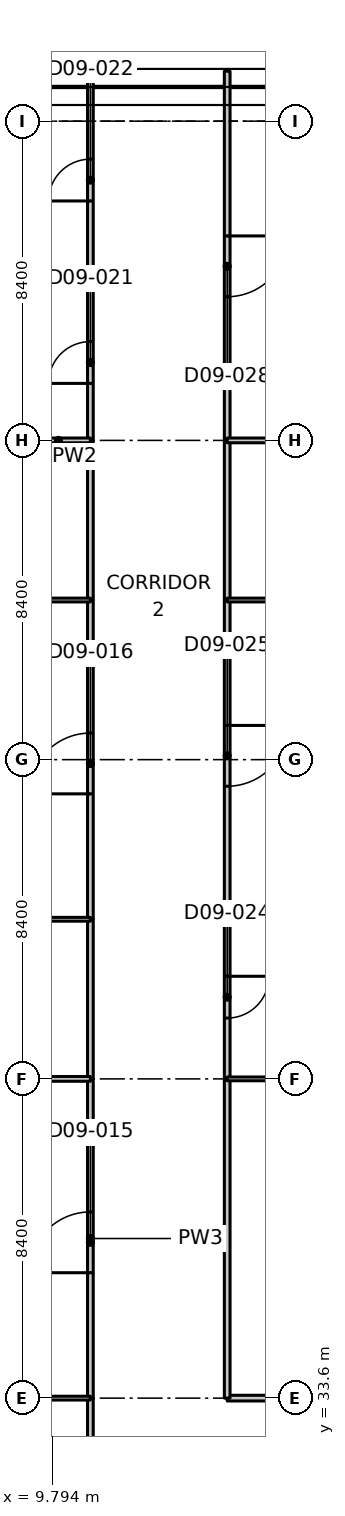
"""IFC4 building model, lengths in metres.
Left out: names, types, materials, properties, quantities, classifications, styles, units other than length and angle.
Written with IfcOpenShell. Run it as: python <this file> out.ifc"""

import sys

from ifc_helpers import new_model, si_unit, direction, frame, frame_2d, origin, place, context, subcontext, project, spatial, polyline, rectangle, outline, extrude, element, fill, save


model = new_model("IFC4")
c1 = context("Model", 3, precision=1e-05, world=origin(), true_north=direction((0.0, 1.0)))
c2 = subcontext(c1, "Body", "Model", "MODEL_VIEW")
j1 = project(units=[si_unit("LENGTHUNIT", "METRE"), si_unit("PLANEANGLEUNIT", "RADIAN")], contexts=[c1])
p1 = place(None, origin())
s1 = spatial("IfcSite", under=j1, at=p1, CompositionType="ELEMENT")
p2 = place(p1, origin())
s2 = spatial("IfcBuilding", under=s1, at=p2, CompositionType="ELEMENT")
p3 = place(p2, frame((0.0, 0.0, 61.7)))
s3 = spatial("IfcBuildingStorey", under=s2, at=p3, CompositionType="ELEMENT", Elevation=61.7)
p4 = place(p3, frame((10.8, 25.2, 0.0), z_axis=(0.0, 0.0, 1.0), x_axis=(0.0, 1.0, 0.0)))
e1 = element("IfcWall", 1, at=p4, inside=s3, PredefinedType="PARTITIONING", context=c2, shape_type="SweptSolid", body=[
    extrude(rectangle(XDim=8.4, YDim=0.15, at=frame_2d((4.2, 0.0))), origin(), (0.0, 0.0, 1.0), 3.33),
])
p5 = place(p4, frame((3.3, 0.0, 0.0)))
e2 = element("IfcOpeningElement", 2, at=p5, cuts=e1, PredefinedType="OPENING", context=c2, shape_type="SweptSolid", body=[
    extrude(rectangle(XDim=1.6, YDim=2.1, at=frame_2d((0.8, 1.05))), frame((0.0, 0.085, 0.0), z_axis=(0.0, -1.0, 0.0), x_axis=(1.0, 0.0, 0.0)), (0.0, 0.0, 1.0), 0.17),
])
p6 = place(p3, frame((14.4, 33.6, 0.0), z_axis=(0.0, 0.0, 1.0), x_axis=(1.0, 0.0, 0.0)))
e3 = element("IfcWall", 3, at=p6, inside=s3, PredefinedType="PARTITIONING", context=c2, shape_type="SweptSolid", body=[
    extrude(rectangle(XDim=1.5, YDim=0.15, at=frame_2d((0.75, 0.0))), origin(), (0.0, 0.0, 1.0), 3.33),
])
p7 = place(p3, frame((10.8, 33.6, 0.0), z_axis=(0.0, 0.0, 1.0), x_axis=(0.0, 1.0, 0.0)))
e4 = element("IfcWall", 4, at=p7, inside=s3, PredefinedType="PARTITIONING", context=c2, shape_type="SweptSolid", body=[
    extrude(rectangle(XDim=8.4, YDim=0.15, at=frame_2d((4.2, 0.0))), origin(), (0.0, 0.0, 1.0), 3.33),
])
p8 = place(p7, frame((3.3, 0.0, 0.0)))
e5 = element("IfcOpeningElement", 5, at=p8, cuts=e4, PredefinedType="OPENING", context=c2, shape_type="SweptSolid", body=[
    extrude(rectangle(XDim=1.6, YDim=2.1, at=frame_2d((0.8, 1.05))), frame((0.0, 0.085, 0.0), z_axis=(0.0, -1.0, 0.0), x_axis=(1.0, 0.0, 0.0)), (0.0, 0.0, 1.0), 0.17),
])
p9 = place(p3, frame((10.8, 46.2, 0.0), z_axis=(0.0, 0.0, 1.0), x_axis=(0.0, 1.0, 0.0)))
e6 = element("IfcWall", 6, at=p9, inside=s3, PredefinedType="PARTITIONING", context=c2, shape_type="SweptSolid", body=[
    extrude(rectangle(XDim=8.4, YDim=0.15, at=frame_2d((4.2, 0.0))), origin(), (0.0, 0.0, 1.0), 3.33),
])
p10 = place(p9, frame((3.3, 0.0, 0.0)))
e7 = element("IfcOpeningElement", 7, at=p10, cuts=e6, PredefinedType="OPENING", context=c2, shape_type="SweptSolid", body=[
    extrude(rectangle(XDim=1.6, YDim=2.1, at=frame_2d((0.8, 1.05))), frame((0.0, 0.085, 0.0), z_axis=(0.0, -1.0, 0.0), x_axis=(1.0, 0.0, 0.0)), (0.0, 0.0, 1.0), 0.17),
])
for number, where, z_axis, x_axis in (
    (8, (10.8, 54.6, 0.0), (0.0, 0.0, 1.0), (0.0, 1.0, 0.0)),
    (9, (10.8, 42.0, 0.0), (0.0, 0.0, 1.0), (0.0, 1.0, 0.0)),
):
    element("IfcWall", number, at=place(p3, frame(where, z_axis=z_axis, x_axis=x_axis)), inside=s3, PredefinedType="PARTITIONING", context=c2, shape_type="SweptSolid", body=[
        extrude(rectangle(XDim=4.2, YDim=0.15, at=frame_2d((2.1, 0.0))), origin(), (0.0, 0.0, 1.0), 3.33),
    ])
p11 = place(p3, frame((10.8, 58.8, 0.0), z_axis=(0.0, 0.0, 1.0), x_axis=(0.0, 1.0, 0.0)))
e10 = element("IfcWall", 10, at=p11, inside=s3, PredefinedType="PARTITIONING", context=c2, shape_type="SweptSolid", body=[
    extrude(rectangle(XDim=4.2, YDim=0.15, at=frame_2d((2.1, 0.0))), origin(), (0.0, 0.0, 1.0), 3.33),
])
p12 = place(p11, frame((1.5, 0.0, 0.0)))
e11 = element("IfcOpeningElement", 11, at=p12, cuts=e10, PredefinedType="OPENING", context=c2, shape_type="SweptSolid", body=[
    extrude(rectangle(XDim=1.1, YDim=2.1, at=frame_2d((0.55, 1.05))), frame((0.0, 0.085, 0.0), z_axis=(0.0, -1.0, 0.0), x_axis=(1.0, 0.0, 0.0)), (0.0, 0.0, 1.0), 0.17),
])
p13 = place(p3, frame((10.8, 63.0, 0.0), z_axis=(0.0, 0.0, 1.0), x_axis=(0.0, 1.0, 0.0)))
e12 = element("IfcWall", 12, at=p13, inside=s3, PredefinedType="PARTITIONING", context=c2, shape_type="SweptSolid", body=[
    extrude(outline(polyline([(0.0, 0.0), (5.514, 0.0), (5.514, 3.33), (5.28, 3.33), (4.65, 3.33), (4.648, 2.98), (3.752, 2.98), (3.75, 3.33), (0.0, 3.33), (0.0, 0.0)])), frame((0.0, 0.075, 0.0), z_axis=(0.0, -1.0, 0.0), x_axis=(1.0, 0.0, 0.0)), (0.0, 0.0, 1.0), 0.15),
])
p14 = place(p13, frame((2.1, 0.0, 0.0)))
e13 = element("IfcOpeningElement", 13, at=p14, cuts=e12, PredefinedType="OPENING", context=c2, shape_type="SweptSolid", body=[
    extrude(rectangle(XDim=1.1, YDim=2.1, at=frame_2d((0.55, 1.05))), frame((0.0, 0.085, 0.0), z_axis=(0.0, -1.0, 0.0), x_axis=(1.0, 0.0, 0.0)), (0.0, 0.0, 1.0), 0.17),
])
p15 = place(p3, frame((14.4, 42.0, 0.0), z_axis=(0.0, 0.0, 1.0), x_axis=(0.0, -1.0, 0.0)))
e14 = element("IfcWall", 14, at=p15, inside=s3, PredefinedType="PARTITIONING", context=c2, shape_type="SweptSolid", body=[
    extrude(rectangle(XDim=8.4, YDim=0.15, at=frame_2d((4.2, 0.0))), origin(), (0.0, 0.0, 1.0), 3.33),
])
p16 = place(p3, frame((14.4, 46.2, 0.0), z_axis=(0.0, 0.0, 1.0), x_axis=(0.0, -1.0, 0.0)))
e15 = element("IfcWall", 15, at=p16, inside=s3, PredefinedType="PARTITIONING", context=c2, shape_type="SweptSolid", body=[
    extrude(rectangle(XDim=4.2, YDim=0.15, at=frame_2d((2.1, 0.0))), origin(), (0.0, 0.0, 1.0), 3.33),
])
p17 = place(p16, frame((1.5, 0.0, 0.0)))
e16 = element("IfcOpeningElement", 16, at=p17, cuts=e15, PredefinedType="OPENING", context=c2, shape_type="SweptSolid", body=[
    extrude(rectangle(XDim=1.1, YDim=2.1, at=frame_2d((0.55, 1.05))), frame((0.0, 0.085, 0.0), z_axis=(0.0, -1.0, 0.0), x_axis=(1.0, 0.0, 0.0)), (0.0, 0.0, 1.0), 0.17),
])
p18 = place(p3, frame((14.4, 54.6, 0.0), z_axis=(0.0, 0.0, 1.0), x_axis=(0.0, -1.0, 0.0)))
e17 = element("IfcWall", 17, at=p18, inside=s3, PredefinedType="PARTITIONING", context=c2, shape_type="SweptSolid", body=[
    extrude(rectangle(XDim=8.4, YDim=0.15, at=frame_2d((4.2, 0.0))), origin(), (0.0, 0.0, 1.0), 3.33),
])
p19 = place(p18, frame((3.3, 0.0, 0.0)))
e18 = element("IfcOpeningElement", 18, at=p19, cuts=e17, PredefinedType="OPENING", context=c2, shape_type="SweptSolid", body=[
    extrude(rectangle(XDim=1.6, YDim=2.1, at=frame_2d((0.8, 1.05))), frame((0.0, 0.085, 0.0), z_axis=(0.0, -1.0, 0.0), x_axis=(1.0, 0.0, 0.0)), (0.0, 0.0, 1.0), 0.17),
])
p20 = place(p3, frame((14.4, 58.8, 0.0), z_axis=(0.0, 0.0, 1.0), x_axis=(0.0, -1.0, 0.0)))
e19 = element("IfcWall", 19, at=p20, inside=s3, PredefinedType="PARTITIONING", context=c2, shape_type="SweptSolid", body=[
    extrude(rectangle(XDim=4.2, YDim=0.15, at=frame_2d((2.1, 0.0))), origin(), (0.0, 0.0, 1.0), 3.33),
])
p21 = place(p3, frame((14.4, 68.514, 0.0), z_axis=(0.0, 0.0, 1.0), x_axis=(0.0, -1.0, 0.0)))
e20 = element("IfcWall", 20, at=p21, inside=s3, PredefinedType="PARTITIONING", context=c2, shape_type="SweptSolid", body=[
    extrude(outline(polyline([(0.0, 0.0), (9.714, 0.0), (9.714, 3.33), (1.764, 3.33), (1.762, 2.98), (0.866, 2.98), (0.864, 3.33), (0.234, 3.33), (0.0, 3.33), (0.0, 0.0)])), frame((0.0, 0.075, 0.0), z_axis=(0.0, -1.0, 0.0), x_axis=(1.0, 0.0, 0.0)), (0.0, 0.0, 1.0), 0.15),
])
p22 = place(p21, frame((4.334, 0.0, 0.0)))
e21 = element("IfcOpeningElement", 21, at=p22, cuts=e20, PredefinedType="OPENING", context=c2, shape_type="SweptSolid", body=[
    extrude(rectangle(XDim=1.6, YDim=2.1, at=frame_2d((0.8, 1.05))), frame((0.0, 0.085, 0.0), z_axis=(0.0, -1.0, 0.0), x_axis=(1.0, 0.0, 0.0)), (0.0, 0.0, 1.0), 0.17),
])
p23 = place(p3, frame((9.12, 33.6, 0.0), z_axis=(0.0, 0.0, 1.0), x_axis=(1.0, 0.0, 0.0)))
e22 = element("IfcWall", 22, at=p23, inside=s3, PredefinedType="PARTITIONING", context=c2, shape_type="SweptSolid", body=[
    extrude(rectangle(XDim=1.68, YDim=0.1, at=frame_2d((0.84, 0.0))), origin(), (0.0, 0.0, 1.0), 3.33),
])
p24 = place(p3, frame((9.12, 42.0, 0.0), z_axis=(0.0, 0.0, 1.0), x_axis=(1.0, 0.0, 0.0)))
e23 = element("IfcWall", 23, at=p24, inside=s3, PredefinedType="PARTITIONING", context=c2, shape_type="SweptSolid", body=[
    extrude(rectangle(XDim=1.68, YDim=0.125, at=frame_2d((0.84, 0.0))), origin(), (0.0, 0.0, 1.0), 3.33),
])
p25 = place(p3, frame((4.2, 54.6, 0.0), z_axis=(0.0, 0.0, 1.0), x_axis=(1.0, 0.0, 0.0)))
e24 = element("IfcWall", 24, at=p25, inside=s3, PredefinedType="PARTITIONING", context=c2, shape_type="SweptSolid", body=[
    extrude(rectangle(XDim=6.6, YDim=0.1, at=frame_2d((3.3, 0.0))), origin(), (0.0, 0.0, 1.0), 3.33),
])
p26 = place(p25, frame((2.7, 0.0, 0.0)))
e25 = element("IfcOpeningElement", 25, at=p26, cuts=e24, PredefinedType="OPENING", context=c2, shape_type="SweptSolid", body=[
    extrude(rectangle(XDim=1.0, YDim=2.1, at=frame_2d((0.5, 1.05))), frame((0.0, 0.06, 0.0), z_axis=(0.0, -1.0, 0.0), x_axis=(1.0, 0.0, 0.0)), (0.0, 0.0, 1.0), 0.12),
])
p27 = place(p3, frame((10.8, 46.2, 0.0), z_axis=(0.0, 0.0, 1.0), x_axis=(-1.0, 0.0, 0.0)))
e26 = element("IfcWall", 26, at=p27, inside=s3, PredefinedType="PARTITIONING", context=c2, shape_type="SweptSolid", body=[
    extrude(rectangle(XDim=7.2, YDim=0.1, at=frame_2d((3.6, 0.0))), origin(), (0.0, 0.0, 1.0), 3.33),
])
p28 = place(p27, frame((3.0, 0.0, 0.0)))
e27 = element("IfcOpeningElement", 27, at=p28, cuts=e26, PredefinedType="OPENING", context=c2, shape_type="SweptSolid", body=[
    extrude(rectangle(XDim=1.0, YDim=2.1, at=frame_2d((0.5, 1.05))), frame((0.0, 0.06, 0.0), z_axis=(0.0, -1.0, 0.0), x_axis=(1.0, 0.0, 0.0)), (0.0, 0.0, 1.0), 0.12),
])
p29 = place(p3, frame((9.12, 58.8, 0.0), z_axis=(0.0, 0.0, 1.0), x_axis=(1.0, 0.0, 0.0)))
e28 = element("IfcWall", 28, at=p29, inside=s3, PredefinedType="PARTITIONING", context=c2, shape_type="SweptSolid", body=[
    extrude(rectangle(XDim=1.68, YDim=0.125, at=frame_2d((0.84, 0.0))), origin(), (0.0, 0.0, 1.0), 3.33),
])
p30 = place(p3, frame((-0.2, 63.0, 0.0), z_axis=(0.0, 0.0, 1.0), x_axis=(1.0, 0.0, 0.0)))
e29 = element("IfcWall", 29, at=p30, inside=s3, PredefinedType="PARTITIONING", context=c2, shape_type="SweptSolid", body=[
    extrude(outline(polyline([(0.0, 0.0), (11.0, 0.0), (11.0, 3.33), (5.066, 3.33), (5.064, 2.98), (3.736, 2.98), (3.734, 3.33), (0.0, 3.33), (0.0, 0.0)])), frame((0.0, 0.05, 0.0), z_axis=(0.0, -1.0, 0.0), x_axis=(1.0, 0.0, 0.0)), (0.0, 0.0, 1.0), 0.1),
])
p31 = place(p3, frame((14.4, 42.0, 0.0), z_axis=(0.0, 0.0, 1.0), x_axis=(1.0, 0.0, 0.0)))
e30 = element("IfcWall", 30, at=p31, inside=s3, PredefinedType="PARTITIONING", context=c2, shape_type="SweptSolid", body=[
    extrude(rectangle(XDim=1.68, YDim=0.1, at=frame_2d((0.84, 0.0))), origin(), (0.0, 0.0, 1.0), 3.33),
])
p32 = place(p3, frame((14.4, 46.2, 0.0), z_axis=(0.0, 0.0, 1.0), x_axis=(1.0, 0.0, 0.0)))
e31 = element("IfcWall", 31, at=p32, inside=s3, PredefinedType="PARTITIONING", context=c2, shape_type="SweptSolid", body=[
    extrude(outline(polyline([(0.0, 0.0), (12.165, 0.0), (12.165, 3.33), (11.9, 3.33), (11.25, 3.33), (11.248, 2.98), (10.352, 2.98), (10.35, 3.33), (0.0, 3.33), (0.0, 0.0)])), frame((0.0, 0.062, 0.0), z_axis=(0.0, -1.0, 0.0), x_axis=(1.0, 0.0, 0.0)), (0.0, 0.0, 1.0), 0.125),
])
p33 = place(p3, frame((14.4, 54.6, 0.0), z_axis=(0.0, 0.0, 1.0), x_axis=(1.0, 0.0, 0.0)))
e32 = element("IfcWall", 32, at=p33, inside=s3, PredefinedType="PARTITIONING", context=c2, shape_type="SweptSolid", body=[
    extrude(rectangle(XDim=7.8, YDim=0.1, at=frame_2d((3.9, 0.0))), origin(), (0.0, 0.0, 1.0), 3.33),
])
p34 = place(p33, frame((3.3, 0.0, 0.0)))
e33 = element("IfcOpeningElement", 33, at=p34, cuts=e32, PredefinedType="OPENING", context=c2, shape_type="SweptSolid", body=[
    extrude(rectangle(XDim=1.0, YDim=2.1, at=frame_2d((0.5, 1.05))), frame((0.0, 0.06, 0.0), z_axis=(0.0, -1.0, 0.0), x_axis=(1.0, 0.0, 0.0)), (0.0, 0.0, 1.0), 0.12),
])
p35 = place(p3, frame((14.4, 58.8, 0.0), z_axis=(0.0, 0.0, 1.0), x_axis=(1.0, 0.0, 0.0)))
e34 = element("IfcWall", 34, at=p35, inside=s3, PredefinedType="PARTITIONING", context=c2, shape_type="SweptSolid", body=[
    extrude(rectangle(XDim=1.68, YDim=0.125, at=frame_2d((0.84, 0.0))), origin(), (0.0, 0.0, 1.0), 3.33),
])
p36 = place(p8, origin())
e35 = element("IfcDoor", 35, at=p36, inside=s3, OperationType="DOUBLE_DOOR_SINGLE_SWING", PredefinedType="DOOR", context=c2, shape_type="SweptSolid", body=[
    extrude(rectangle(XDim=1.6, YDim=2.1, at=frame_2d((0.8, 1.05))), frame((0.0, 0.025, 0.0), z_axis=(0.0, -1.0, 0.0), x_axis=(1.0, 0.0, 0.0)), (0.0, 0.0, 1.0), 0.05),
])
fill(e5, e35)
p37 = place(p10, origin())
e36 = element("IfcDoor", 36, at=p37, inside=s3, OperationType="DOUBLE_DOOR_SINGLE_SWING", PredefinedType="DOOR", context=c2, shape_type="SweptSolid", body=[
    extrude(rectangle(XDim=1.6, YDim=2.1, at=frame_2d((0.8, 1.05))), frame((0.0, 0.025, 0.0), z_axis=(0.0, -1.0, 0.0), x_axis=(1.0, 0.0, 0.0)), (0.0, 0.0, 1.0), 0.05),
])
fill(e7, e36)
p38 = place(p12, origin())
e37 = element("IfcDoor", 37, at=p38, inside=s3, OperationType="SINGLE_SWING_LEFT", PredefinedType="DOOR", context=c2, shape_type="SweptSolid", body=[
    extrude(rectangle(XDim=1.1, YDim=2.1, at=frame_2d((0.55, 1.05))), frame((0.0, 0.025, 0.0), z_axis=(0.0, -1.0, 0.0), x_axis=(1.0, 0.0, 0.0)), (0.0, 0.0, 1.0), 0.05),
])
fill(e11, e37)
p39 = place(p14, origin())
e38 = element("IfcDoor", 38, at=p39, inside=s3, OperationType="SINGLE_SWING_LEFT", PredefinedType="DOOR", context=c2, shape_type="SweptSolid", body=[
    extrude(rectangle(XDim=1.1, YDim=2.1, at=frame_2d((0.55, 1.05))), frame((0.0, 0.025, 0.0), z_axis=(0.0, -1.0, 0.0), x_axis=(1.0, 0.0, 0.0)), (0.0, 0.0, 1.0), 0.05),
])
fill(e13, e38)
p40 = place(p17, origin())
e39 = element("IfcDoor", 39, at=p40, inside=s3, OperationType="SINGLE_SWING_LEFT", PredefinedType="DOOR", context=c2, shape_type="SweptSolid", body=[
    extrude(rectangle(XDim=1.1, YDim=2.1, at=frame_2d((0.55, 1.05))), frame((0.0, 0.025, 0.0), z_axis=(0.0, -1.0, 0.0), x_axis=(1.0, 0.0, 0.0)), (0.0, 0.0, 1.0), 0.05),
])
fill(e16, e39)
p41 = place(p19, origin())
e40 = element("IfcDoor", 40, at=p41, inside=s3, OperationType="DOUBLE_DOOR_SINGLE_SWING", PredefinedType="DOOR", context=c2, shape_type="SweptSolid", body=[
    extrude(rectangle(XDim=1.6, YDim=2.1, at=frame_2d((0.8, 1.05))), frame((0.0, 0.025, 0.0), z_axis=(0.0, -1.0, 0.0), x_axis=(1.0, 0.0, 0.0)), (0.0, 0.0, 1.0), 0.05),
])
fill(e18, e40)
p42 = place(p22, origin())
e41 = element("IfcDoor", 41, at=p42, inside=s3, OperationType="DOUBLE_DOOR_SINGLE_SWING", PredefinedType="DOOR", context=c2, shape_type="SweptSolid", body=[
    extrude(rectangle(XDim=1.6, YDim=2.1, at=frame_2d((0.8, 1.05))), frame((0.0, 0.025, 0.0), z_axis=(0.0, -1.0, 0.0), x_axis=(1.0, 0.0, 0.0)), (0.0, 0.0, 1.0), 0.05),
])
fill(e21, e41)
save(model, sys.argv[1])
